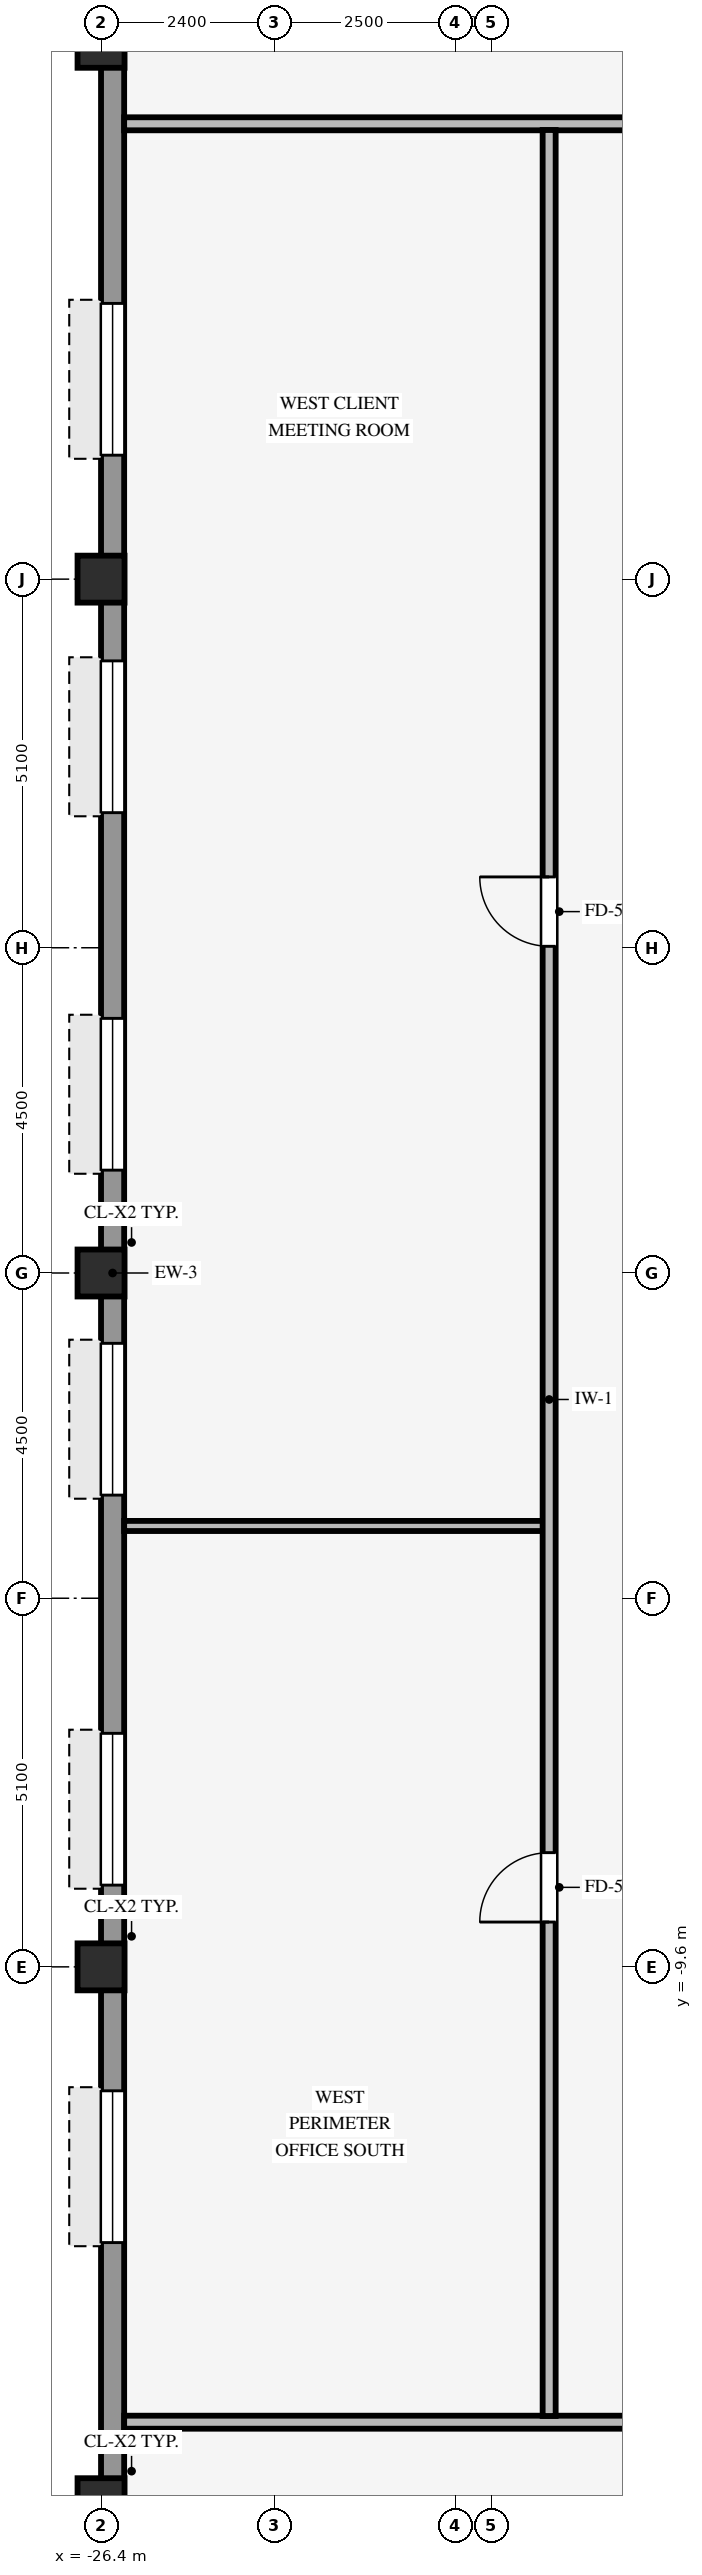
"""IFC4 building model, lengths in metres.
Left out: names, types, materials, properties, quantities, classifications, styles, units other than length and angle.
Written with IfcOpenShell. Run it as: python <this file> out.ifc"""

import sys

from ifc_helpers import new_model, si_unit, direction, frame, frame_2d, origin, origin_2d, place, context, subcontext, project, spatial, rectangle, hollow_rectangle, extrude, source, transform, mapped, element, fill, save


model = new_model("IFC4")
c1 = context("Model", 3, precision=1e-05, world=origin(), true_north=direction((0.0, 1.0)))
c2 = subcontext(c1, "Body", "Model", "MODEL_VIEW")
j1 = project(units=[si_unit("LENGTHUNIT", "METRE"), si_unit("PLANEANGLEUNIT", "RADIAN")], contexts=[c1])
p1 = place(None, origin())
s1 = spatial("IfcSite", under=j1, at=p1, CompositionType="ELEMENT")
p2 = place(p1, origin())
s2 = spatial("IfcBuilding", under=s1, at=p2, CompositionType="ELEMENT")
p3 = place(p2, frame((0.0, 0.0, 134.8)))
s3 = spatial("IfcBuildingStorey", under=s2, at=p3, CompositionType="ELEMENT", Elevation=134.8)
for number, where, z_axis, x_axis in (
    (1, (-26.4, -17.0, 0.0), (0.0, 0.0, 1.0), (1.0, 0.0, 0.0)),
    (2, (-26.4, -9.6, 0.0), (0.0, 0.0, 1.0), (1.0, 0.0, 0.0)),
    (3, (-26.4, 0.0, 0.0), (0.0, 0.0, 1.0), (1.0, 0.0, 0.0)),
    (4, (-26.4, 9.6, 0.0), (0.0, 0.0, 1.0), (1.0, 0.0, 0.0)),
    (5, (-26.4, 17.0, 0.0), (0.0, 0.0, 1.0), (1.0, 0.0, 0.0)),
):
    element("IfcColumn", number, at=place(p3, frame(where, z_axis=z_axis, x_axis=x_axis)), inside=s3, PredefinedType="COLUMN", context=c2, shape_type="SweptSolid", body=[
        extrude(hollow_rectangle(XDim=0.65, YDim=0.65, WallThickness=0.04, InnerFilletRadius=0.04, OuterFilletRadius=0.08, at=origin_2d()), origin(), (0.0, 0.0, 1.0), 3.37),
    ])
p4 = place(p3, frame((-26.24, -20.784, 0.0), z_axis=(0.0, 0.0, 1.0), x_axis=(0.0, 1.0, 0.0)))
e6 = element("IfcWall", 6, at=p4, inside=s3, PredefinedType="STANDARD", context=c2, shape_type="SweptSolid", body=[
    extrude(rectangle(XDim=41.568, YDim=0.32, at=frame_2d((20.784, 0.0))), origin(), (0.0, 0.0, 1.0), 2.705),
])
p5 = place(p4, frame((7.369, 0.0, 0.8)))
e7 = element("IfcOpeningElement", 7, at=p5, cuts=e6, PredefinedType="OPENING", context=c2, shape_type="SweptSolid", body=[
    extrude(rectangle(XDim=2.1, YDim=1.56, at=frame_2d((1.05, 0.78))), frame((0.0, 0.17, 0.0), z_axis=(0.0, -1.0, 0.0), x_axis=(1.0, 0.0, 0.0)), (0.0, 0.0, 1.0), 0.34),
])
p6 = place(p4, frame((12.315, 0.0, 0.8)))
e8 = element("IfcOpeningElement", 8, at=p6, cuts=e6, PredefinedType="OPENING", context=c2, shape_type="SweptSolid", body=[
    extrude(rectangle(XDim=2.1, YDim=1.56, at=frame_2d((1.05, 0.78))), frame((0.0, 0.17, 0.0), z_axis=(0.0, -1.0, 0.0), x_axis=(1.0, 0.0, 0.0)), (0.0, 0.0, 1.0), 0.34),
])
p7 = place(p4, frame((17.711, 0.0, 0.8)))
e9 = element("IfcOpeningElement", 9, at=p7, cuts=e6, PredefinedType="OPENING", context=c2, shape_type="SweptSolid", body=[
    extrude(rectangle(XDim=2.1, YDim=1.56, at=frame_2d((1.05, 0.78))), frame((0.0, 0.17, 0.0), z_axis=(0.0, -1.0, 0.0), x_axis=(1.0, 0.0, 0.0)), (0.0, 0.0, 1.0), 0.34),
])
p8 = place(p4, frame((22.207, 0.0, 0.8)))
e10 = element("IfcOpeningElement", 10, at=p8, cuts=e6, PredefinedType="OPENING", context=c2, shape_type="SweptSolid", body=[
    extrude(rectangle(XDim=2.1, YDim=1.56, at=frame_2d((1.05, 0.78))), frame((0.0, 0.17, 0.0), z_axis=(0.0, -1.0, 0.0), x_axis=(1.0, 0.0, 0.0)), (0.0, 0.0, 1.0), 0.34),
])
p9 = place(p4, frame((27.153, 0.0, 0.8)))
e11 = element("IfcOpeningElement", 11, at=p9, cuts=e6, PredefinedType="OPENING", context=c2, shape_type="SweptSolid", body=[
    extrude(rectangle(XDim=2.1, YDim=1.56, at=frame_2d((1.05, 0.78))), frame((0.0, 0.17, 0.0), z_axis=(0.0, -1.0, 0.0), x_axis=(1.0, 0.0, 0.0)), (0.0, 0.0, 1.0), 0.34),
])
p10 = place(p4, frame((32.099, 0.0, 0.8)))
e12 = element("IfcOpeningElement", 12, at=p10, cuts=e6, PredefinedType="OPENING", context=c2, shape_type="SweptSolid", body=[
    extrude(rectangle(XDim=2.1, YDim=1.56, at=frame_2d((1.05, 0.78))), frame((0.0, 0.17, 0.0), z_axis=(0.0, -1.0, 0.0), x_axis=(1.0, 0.0, 0.0)), (0.0, 0.0, 1.0), 0.34),
])
p11 = place(p3, frame((-26.08, -15.9, 0.0), z_axis=(0.0, 0.0, 1.0), x_axis=(1.0, 0.0, 0.0)))
e13 = element("IfcWall", 13, at=p11, inside=s3, PredefinedType="PARTITIONING", context=c2, shape_type="SweptSolid", body=[
    extrude(rectangle(XDim=52.16, YDim=0.18, at=frame_2d((26.08, 0.0))), origin(), (0.0, 0.0, 1.0), 3.36),
])
p12 = place(p11, frame((14.28, 0.0, 0.0)))
e14 = element("IfcOpeningElement", 14, at=p12, cuts=e13, PredefinedType="OPENING", context=c2, shape_type="SweptSolid", body=[
    extrude(rectangle(XDim=0.96, YDim=2.1, at=frame_2d((0.48, 1.05))), frame((0.0, 0.1, 0.0), z_axis=(0.0, -1.0, 0.0), x_axis=(1.0, 0.0, 0.0)), (0.0, 0.0, 1.0), 0.2),
])
p13 = place(p11, frame((40.5, 0.0, 0.0)))
e15 = element("IfcOpeningElement", 15, at=p13, cuts=e13, PredefinedType="OPENING", context=c2, shape_type="SweptSolid", body=[
    extrude(rectangle(XDim=0.96, YDim=2.1, at=frame_2d((0.48, 1.05))), frame((0.0, 0.1, 0.0), z_axis=(0.0, -1.0, 0.0), x_axis=(1.0, 0.0, 0.0)), (0.0, 0.0, 1.0), 0.2),
])
p14 = place(p3, frame((-26.08, -3.5, 0.0), z_axis=(0.0, 0.0, 1.0), x_axis=(1.0, 0.0, 0.0)))
e16 = element("IfcWall", 16, at=p14, inside=s3, PredefinedType="PARTITIONING", context=c2, shape_type="SweptSolid", body=[
    extrude(rectangle(XDim=5.794, YDim=0.14, at=frame_2d((2.897, 0.0))), origin(), (0.0, 0.0, 1.0), 3.36),
])
p15 = place(p3, frame((-26.08, 15.9, 0.0), z_axis=(0.0, 0.0, 1.0), x_axis=(1.0, 0.0, 0.0)))
e17 = element("IfcWall", 17, at=p15, inside=s3, PredefinedType="PARTITIONING", context=c2, shape_type="SweptSolid", body=[
    extrude(rectangle(XDim=52.16, YDim=0.18, at=frame_2d((26.08, 0.0))), origin(), (0.0, 0.0, 1.0), 3.36),
])
p16 = place(p15, frame((18.3, 0.0, 0.0)))
e18 = element("IfcOpeningElement", 18, at=p16, cuts=e17, PredefinedType="OPENING", context=c2, shape_type="SweptSolid", body=[
    extrude(rectangle(XDim=0.96, YDim=2.1, at=frame_2d((0.48, 1.05))), frame((0.0, 0.1, 0.0), z_axis=(0.0, -1.0, 0.0), x_axis=(1.0, 0.0, 0.0)), (0.0, 0.0, 1.0), 0.2),
])
p17 = place(p15, frame((40.5, 0.0, 0.0)))
e19 = element("IfcOpeningElement", 19, at=p17, cuts=e17, PredefinedType="OPENING", context=c2, shape_type="SweptSolid", body=[
    extrude(rectangle(XDim=0.96, YDim=2.1, at=frame_2d((0.48, 1.05))), frame((0.0, 0.1, 0.0), z_axis=(0.0, -1.0, 0.0), x_axis=(1.0, 0.0, 0.0)), (0.0, 0.0, 1.0), 0.2),
])
p18 = place(p3, frame((-20.2, -15.814, 0.0), z_axis=(0.0, 0.0, 1.0), x_axis=(0.0, 1.0, 0.0)))
e20 = element("IfcWall", 20, at=p18, inside=s3, PredefinedType="PARTITIONING", context=c2, shape_type="SweptSolid", body=[
    extrude(rectangle(XDim=31.628, YDim=0.18, at=frame_2d((15.814, 0.0))), origin(), (0.0, 0.0, 1.0), 3.36),
])
p19 = place(p18, frame((20.334, 0.0, 0.0)))
e21 = element("IfcOpeningElement", 21, at=p19, cuts=e20, PredefinedType="OPENING", context=c2, shape_type="SweptSolid", body=[
    extrude(rectangle(XDim=0.96, YDim=2.1, at=frame_2d((0.48, 1.05))), frame((0.0, 0.1, 0.0), z_axis=(0.0, -1.0, 0.0), x_axis=(1.0, 0.0, 0.0)), (0.0, 0.0, 1.0), 0.2),
])
p20 = place(p18, frame((6.834, 0.0, 0.0)))
e22 = element("IfcOpeningElement", 22, at=p20, cuts=e20, PredefinedType="OPENING", context=c2, shape_type="SweptSolid", body=[
    extrude(rectangle(XDim=0.96, YDim=2.1, at=frame_2d((0.48, 1.05))), frame((0.0, 0.1, 0.0), z_axis=(0.0, -1.0, 0.0), x_axis=(1.0, 0.0, 0.0)), (0.0, 0.0, 1.0), 0.2),
])
m1 = source(origin(), c2, "Body", "SweptSolid", [
    extrude(rectangle(XDim=2.1, YDim=1.56, at=frame_2d((1.05, 0.78))), frame((0.0, 0.03, 0.0), z_axis=(0.0, -1.0, 0.0), x_axis=(1.0, 0.0, 0.0)), (0.0, 0.0, 1.0), 0.06),
])
p21 = place(p5, origin())
e23 = element("IfcWindow", 23, at=p21, inside=s3, PartitioningType="SINGLE_PANEL", PredefinedType="WINDOW", context=c2, shape_type="MappedRepresentation", body=[
    mapped(m1, transform((0.0, 0.0, 0.0), scale=1.0)),
])
fill(e7, e23)
p22 = place(p6, origin())
e24 = element("IfcWindow", 24, at=p22, inside=s3, PartitioningType="SINGLE_PANEL", PredefinedType="WINDOW", context=c2, shape_type="MappedRepresentation", body=[
    mapped(m1, transform((0.0, 0.0, 0.0), scale=1.0)),
])
fill(e8, e24)
p23 = place(p7, origin())
e25 = element("IfcWindow", 25, at=p23, inside=s3, PartitioningType="SINGLE_PANEL", PredefinedType="WINDOW", context=c2, shape_type="MappedRepresentation", body=[
    mapped(m1, transform((0.0, 0.0, 0.0), scale=1.0)),
])
fill(e9, e25)
p24 = place(p8, origin())
e26 = element("IfcWindow", 26, at=p24, inside=s3, PartitioningType="SINGLE_PANEL", PredefinedType="WINDOW", context=c2, shape_type="MappedRepresentation", body=[
    mapped(m1, transform((0.0, 0.0, 0.0), scale=1.0)),
])
fill(e10, e26)
p25 = place(p9, origin())
e27 = element("IfcWindow", 27, at=p25, inside=s3, PartitioningType="SINGLE_PANEL", PredefinedType="WINDOW", context=c2, shape_type="MappedRepresentation", body=[
    mapped(m1, transform((0.0, 0.0, 0.0), scale=1.0)),
])
fill(e11, e27)
p26 = place(p10, origin())
e28 = element("IfcWindow", 28, at=p26, inside=s3, PartitioningType="SINGLE_PANEL", PredefinedType="WINDOW", context=c2, shape_type="MappedRepresentation", body=[
    mapped(m1, transform((0.0, 0.0, 0.0), scale=1.0)),
])
fill(e12, e28)
m2 = source(origin(), c2, "Body", "SweptSolid", [
    extrude(rectangle(XDim=0.96, YDim=2.1, at=frame_2d((0.48, 1.05))), frame((0.0, 0.025, 0.0), z_axis=(0.0, -1.0, 0.0), x_axis=(1.0, 0.0, 0.0)), (0.0, 0.0, 1.0), 0.05),
])
p27 = place(p19, origin())
e29 = element("IfcDoor", 29, at=p27, inside=s3, OperationType="SINGLE_SWING_RIGHT", PredefinedType="DOOR", context=c2, shape_type="MappedRepresentation", body=[
    mapped(m2, transform((0.0, 0.0, 0.0), scale=1.0)),
])
fill(e21, e29)
p28 = place(p20, origin())
e30 = element("IfcDoor", 30, at=p28, inside=s3, OperationType="SINGLE_SWING_LEFT", PredefinedType="DOOR", context=c2, shape_type="MappedRepresentation", body=[
    mapped(m2, transform((0.0, 0.0, 0.0), scale=1.0)),
])
fill(e22, e30)
save(model, sys.argv[1])
